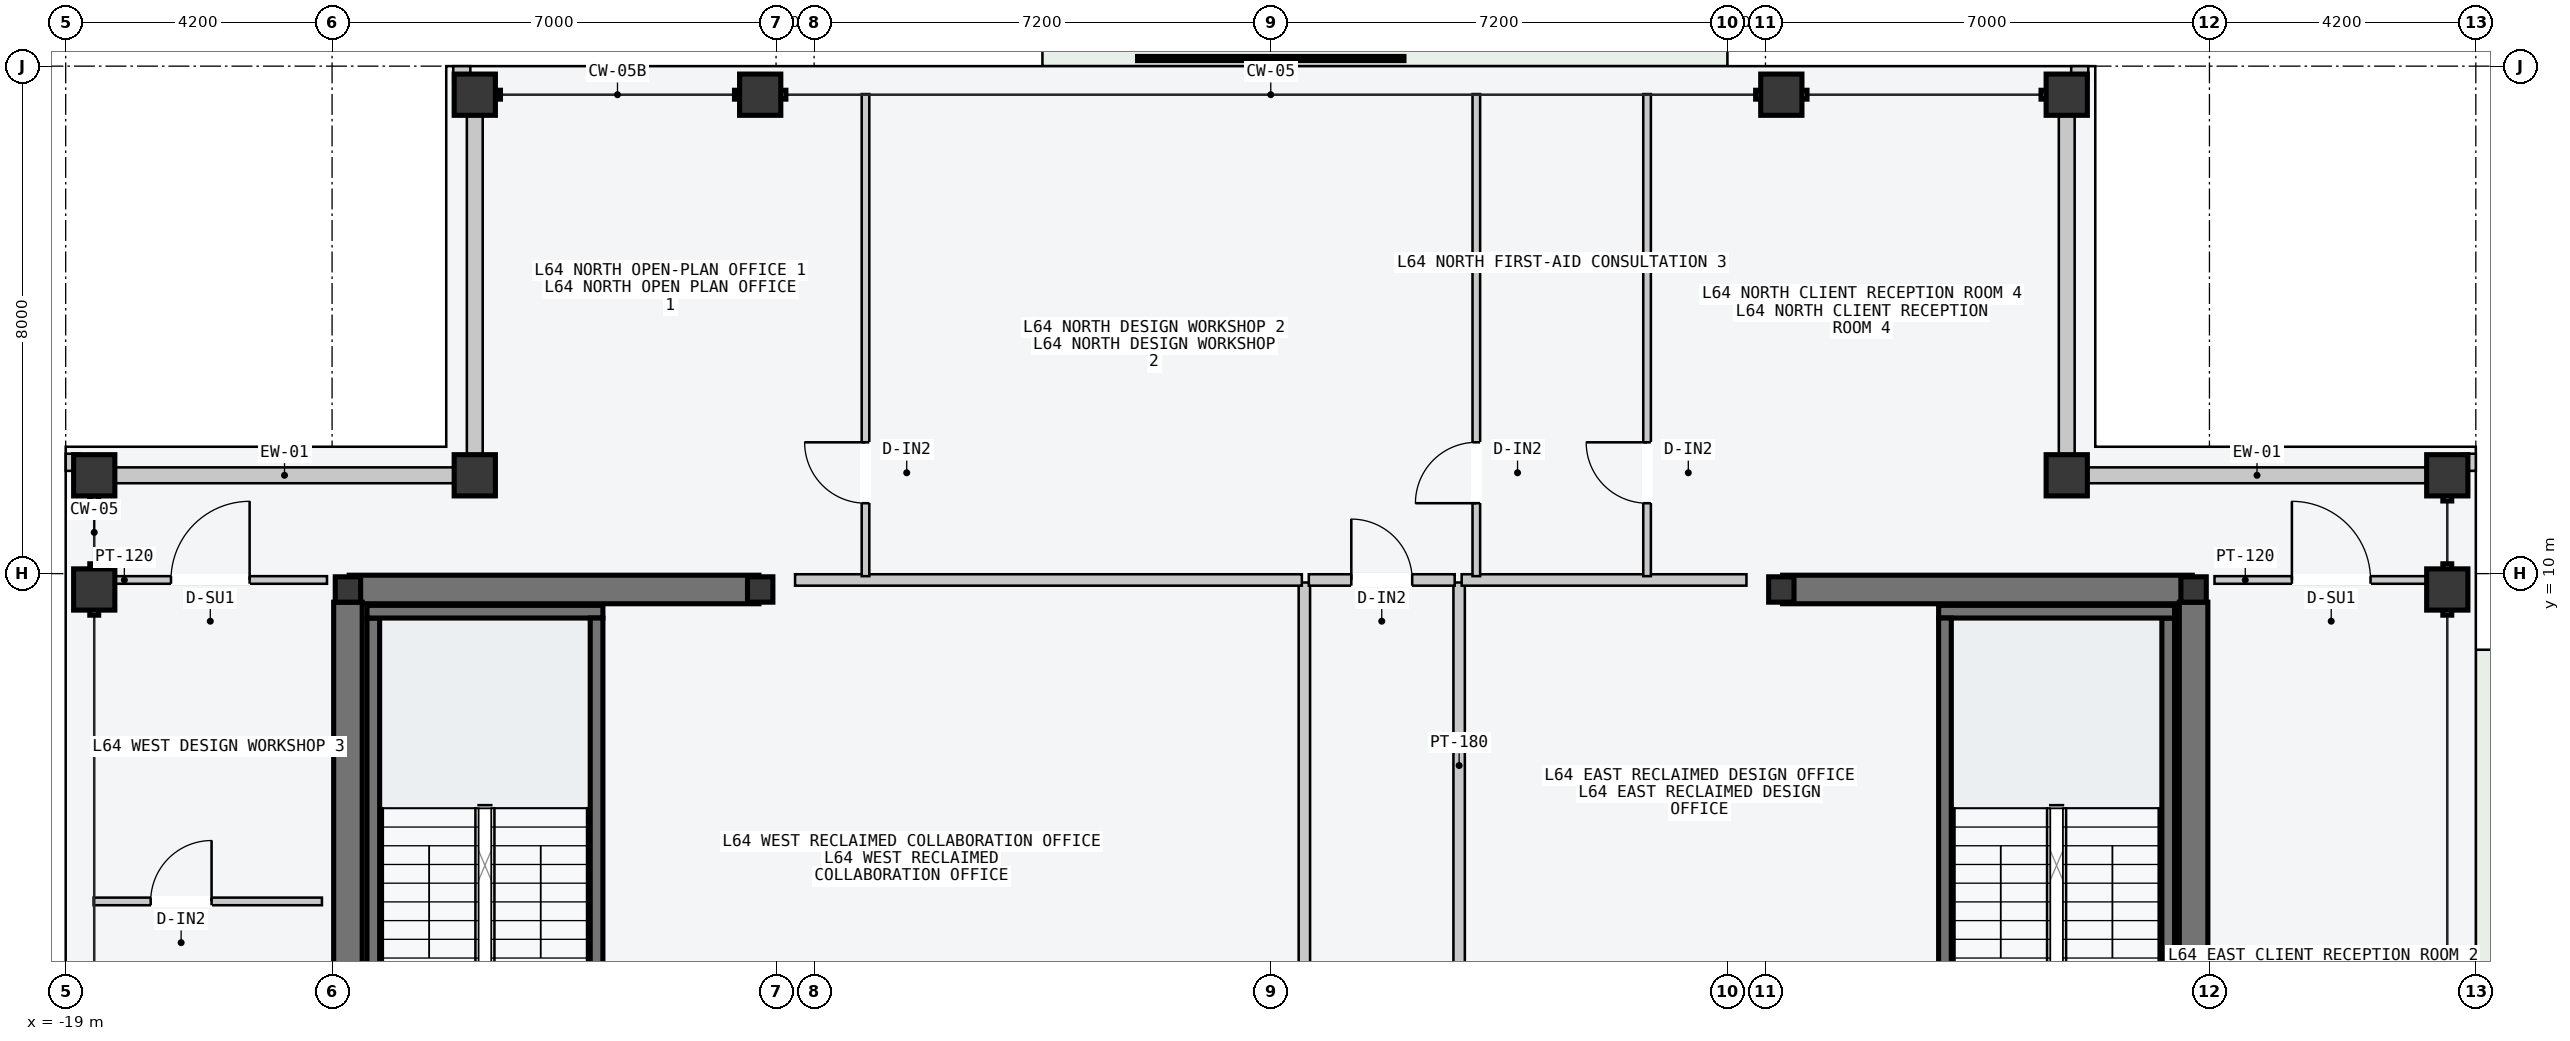
"""IFC4 building model, lengths in metres.
Left out: names, types, materials, properties, quantities, classifications, styles, units other than length and angle.
Written with IfcOpenShell. Run it as: python <this file> out.ifc"""

import sys

from ifc_helpers import new_model, si_unit, direction, frame, frame_2d, origin, origin_2d, place, context, subcontext, project, spatial, rectangle, hollow_rectangle, i_section, extrude, element, fill, save


model = new_model("IFC4")
c1 = context("Model", 3, precision=1e-05, world=origin(), true_north=direction((0.0, 1.0)))
c2 = subcontext(c1, "Body", "Model", "MODEL_VIEW")
j1 = project(units=[si_unit("LENGTHUNIT", "METRE"), si_unit("PLANEANGLEUNIT", "RADIAN")], contexts=[c1])
p1 = place(None, origin())
s1 = spatial("IfcSite", under=j1, at=p1, CompositionType="ELEMENT")
p2 = place(p1, origin())
s2 = spatial("IfcBuilding", under=s1, at=p2, CompositionType="ELEMENT")
p3 = place(p2, frame((0.0, 0.0, 243.6)))
s3 = spatial("IfcBuildingStorey", under=s2, at=p3, CompositionType="ELEMENT", Elevation=243.6)
p4 = place(p3, frame((-14.53, 9.75, -0.2), z_axis=(0.0, 0.0, 1.0), x_axis=(1.0, 0.0, 0.0)))
e1 = element("IfcWall", 1, at=p4, inside=s3, PredefinedType="SHEAR", context=c2, shape_type="SweptSolid", body=[
    extrude(rectangle(XDim=6.46, YDim=0.45, at=frame_2d((3.23, 0.0))), origin(), (0.0, 0.0, 1.0), 3.6),
])
p5 = place(p3, frame((-14.55, 0.2, -0.2), z_axis=(0.0, 0.0, 1.0), x_axis=(0.0, 1.0, 0.0)))
e2 = element("IfcWall", 2, at=p5, inside=s3, PredefinedType="SHEAR", context=c2, shape_type="SweptSolid", body=[
    extrude(rectangle(XDim=9.35, YDim=0.45, at=frame_2d((4.675, 0.0))), origin(), (0.0, 0.0, 1.0), 3.6),
])
p6 = place(p3, frame((8.07, 9.75, -0.2), z_axis=(0.0, 0.0, 1.0), x_axis=(1.0, 0.0, 0.0)))
e3 = element("IfcWall", 3, at=p6, inside=s3, PredefinedType="SHEAR", context=c2, shape_type="SweptSolid", body=[
    extrude(rectangle(XDim=6.46, YDim=0.45, at=frame_2d((3.23, 0.0))), origin(), (0.0, 0.0, 1.0), 3.6),
])
p7 = place(p3, frame((14.55, 0.2, -0.2), z_axis=(0.0, 0.0, 1.0), x_axis=(0.0, 1.0, 0.0)))
e4 = element("IfcWall", 4, at=p7, inside=s3, PredefinedType="SHEAR", context=c2, shape_type="SweptSolid", body=[
    extrude(rectangle(XDim=9.35, YDim=0.45, at=frame_2d((4.675, 0.0))), origin(), (0.0, 0.0, 1.0), 3.6),
])
for number, where, z_axis, x_axis in (
    (5, (-14.15, 1.5, -0.2), (0.0, 0.0, 1.0), (0.0, 1.0, 0.0)),
    (6, (14.15, 1.5, -0.2), (0.0, 0.0, 1.0), (0.0, 1.0, 0.0)),
):
    element("IfcWall", number, at=place(p3, frame(where, z_axis=z_axis, x_axis=x_axis)), inside=s3, PredefinedType="SOLIDWALL", context=c2, shape_type="SweptSolid", body=[
        extrude(rectangle(XDim=7.8, YDim=0.2, at=frame_2d((3.9, 0.0))), origin(), (0.0, 0.0, 1.0), 3.6),
    ])
p8 = place(p3, frame((-14.25, 9.4, -0.2), z_axis=(0.0, 0.0, 1.0), x_axis=(1.0, 0.0, 0.0)))
e7 = element("IfcWall", 7, at=p8, inside=s3, PredefinedType="SOLIDWALL", context=c2, shape_type="SweptSolid", body=[
    extrude(rectangle(XDim=3.72, YDim=0.2, at=frame_2d((1.86, 0.0))), origin(), (0.0, 0.0, 1.0), 3.6),
])
p9 = place(p3, frame((-10.63, 1.5, -0.2), z_axis=(0.0, 0.0, 1.0), x_axis=(0.0, 1.0, 0.0)))
e8 = element("IfcWall", 8, at=p9, inside=s3, PredefinedType="SOLIDWALL", context=c2, shape_type="SweptSolid", body=[
    extrude(rectangle(XDim=7.8, YDim=0.2, at=frame_2d((3.9, 0.0))), origin(), (0.0, 0.0, 1.0), 3.6),
])
p10 = place(p3, frame((10.53, 9.4, -0.2), z_axis=(0.0, 0.0, 1.0), x_axis=(1.0, 0.0, 0.0)))
e9 = element("IfcWall", 9, at=p10, inside=s3, PredefinedType="SOLIDWALL", context=c2, shape_type="SweptSolid", body=[
    extrude(rectangle(XDim=3.72, YDim=0.2, at=frame_2d((1.86, 0.0))), origin(), (0.0, 0.0, 1.0), 3.6),
])
p11 = place(p3, frame((10.63, 1.5, -0.2), z_axis=(0.0, 0.0, 1.0), x_axis=(0.0, 1.0, 0.0)))
e10 = element("IfcWall", 10, at=p11, inside=s3, PredefinedType="SOLIDWALL", context=c2, shape_type="SweptSolid", body=[
    extrude(rectangle(XDim=7.8, YDim=0.2, at=frame_2d((3.9, 0.0))), origin(), (0.0, 0.0, 1.0), 3.6),
])
for number, where, z_axis, x_axis in (
    (11, (-14.55, 9.75, 0.0), (0.0, 0.0, 1.0), (1.0, 0.0, 0.0)),
    (12, (-8.05, 9.75, 0.0), (0.0, 0.0, 1.0), (1.0, 0.0, 0.0)),
    (13, (8.05, 9.75, 0.0), (0.0, 0.0, 1.0), (1.0, 0.0, 0.0)),
    (14, (14.55, 9.75, 0.0), (0.0, 0.0, 1.0), (1.0, 0.0, 0.0)),
):
    element("IfcColumn", number, at=place(p3, frame(where, z_axis=z_axis, x_axis=x_axis)), inside=s3, PredefinedType="COLUMN", context=c2, shape_type="SweptSolid", body=[
        extrude(i_section(OverallWidth=0.4, OverallDepth=0.4, WebThickness=0.013, FlangeThickness=0.021, at=origin_2d()), origin(), (0.0, 0.0, 1.0), 3.6),
    ])
for number, where, z_axis, x_axis in (
    (15, (-12.55, 17.55, 0.0), (0.0, 0.0, 1.0), (1.0, 0.0, 0.0)),
    (16, (-8.05, 17.55, 0.0), (0.0, 0.0, 1.0), (1.0, 0.0, 0.0)),
    (17, (8.05, 17.55, 0.0), (0.0, 0.0, 1.0), (1.0, 0.0, 0.0)),
    (18, (12.55, 17.55, 0.0), (0.0, 0.0, 1.0), (1.0, 0.0, 0.0)),
    (19, (-18.55, 9.75, 0.0), (0.0, 0.0, 1.0), (0.0, 1.0, 0.0)),
    (20, (-18.55, 11.55, 0.0), (0.0, 0.0, 1.0), (0.0, 1.0, 0.0)),
    (21, (18.55, 9.75, 0.0), (0.0, 0.0, 1.0), (0.0, 1.0, 0.0)),
    (22, (18.55, 11.55, 0.0), (0.0, 0.0, 1.0), (0.0, 1.0, 0.0)),
    (23, (-12.55, 11.55, 0.0), (0.0, 0.0, 1.0), (1.0, 0.0, 0.0)),
    (24, (12.55, 11.55, 0.0), (0.0, 0.0, 1.0), (1.0, 0.0, 0.0)),
):
    element("IfcColumn", number, at=place(p3, frame(where, z_axis=z_axis, x_axis=x_axis)), inside=s3, PredefinedType="COLUMN", context=c2, shape_type="SweptSolid", body=[
        extrude(hollow_rectangle(XDim=0.65, YDim=0.65, WallThickness=0.028, at=origin_2d()), origin(), (0.0, 0.0, 1.0), 3.6),
    ])
for number, where, z_axis, x_axis in (
    (25, (-18.215, 11.55, 0.0), (0.0, 0.0, 1.0), (1.0, 0.0, 0.0)),
    (26, (-12.55, 11.885, 0.0), (0.0, 0.0, 1.0), (0.0, 1.0, 0.0)),
    (27, (12.885, 11.55, 0.0), (0.0, 0.0, 1.0), (1.0, 0.0, 0.0)),
    (28, (12.55, 11.885, 0.0), (0.0, 0.0, 1.0), (0.0, 1.0, 0.0)),
):
    element("IfcWall", number, at=place(p3, frame(where, z_axis=z_axis, x_axis=x_axis)), inside=s3, PredefinedType="STANDARD", context=c2, shape_type="SweptSolid", body=[
        extrude(rectangle(XDim=5.33, YDim=0.25, at=frame_2d((2.665, 0.0))), origin(), (0.0, 0.0, 1.0), 2.85),
    ])
for number, where, z_axis, x_axis in (
    (29, (-12.89, 17.89, 0.0), (0.0, 0.0, 1.0), (1.0, 0.0, 0.0)),
    (30, (-18.89, 11.62, 0.0), (0.0, 0.0, 1.0), (0.0, 1.0, 0.0)),
    (31, (12.62, 17.89, 0.0), (0.0, 0.0, 1.0), (1.0, 0.0, 0.0)),
    (32, (18.89, 11.62, 0.0), (0.0, 0.0, 1.0), (0.0, 1.0, 0.0)),
):
    element("IfcWall", number, at=place(p3, frame(where, z_axis=z_axis, x_axis=x_axis)), inside=s3, PredefinedType="PARAPET", context=c2, shape_type="SweptSolid", body=[
        extrude(rectangle(XDim=0.27, YDim=0.22, at=frame_2d((0.135, 0.0))), origin(), (0.0, 0.0, 1.0), 1.2),
    ])
p12 = place(p3, frame((0.53, -3.5, 0.0), z_axis=(0.0, 0.0, 1.0), x_axis=(0.0, 1.0, 0.0)))
e33 = element("IfcWall", 33, at=p12, inside=s3, PredefinedType="PARTITIONING", context=c2, shape_type="SweptSolid", body=[
    extrude(rectangle(XDim=13.36, YDim=0.18, at=frame_2d((6.68, 0.0))), origin(), (0.0, 0.0, 1.0), 3.4),
])
p13 = place(p12, frame((6.1, 0.0, 0.0)))
e34 = element("IfcOpeningElement", 34, at=p13, cuts=e33, PredefinedType="OPENING", context=c2, shape_type="SweptSolid", body=[
    extrude(rectangle(XDim=1.24, YDim=2.24, at=frame_2d((0.62, 1.12))), frame((0.0, 0.1, 0.0), z_axis=(0.0, -1.0, 0.0), x_axis=(1.0, 0.0, 0.0)), (0.0, 0.0, 1.0), 0.2),
])
p14 = place(p12, frame((1.6, 0.0, 0.0)))
e35 = element("IfcOpeningElement", 35, at=p14, cuts=e33, PredefinedType="OPENING", context=c2, shape_type="SweptSolid", body=[
    extrude(rectangle(XDim=0.96, YDim=2.18, at=frame_2d((0.48, 1.09))), frame((0.0, 0.1, 0.0), z_axis=(0.0, -1.0, 0.0), x_axis=(1.0, 0.0, 0.0)), (0.0, 0.0, 1.0), 0.2),
])
p15 = place(p3, frame((-7.5, 9.9, 0.0), z_axis=(0.0, 0.0, 1.0), x_axis=(1.0, 0.0, 0.0)))
e36 = element("IfcWall", 36, at=p15, inside=s3, PredefinedType="PARTITIONING", context=c2, shape_type="SweptSolid", body=[
    extrude(rectangle(XDim=7.99, YDim=0.18, at=frame_2d((3.995, 0.0))), origin(), (0.0, 0.0, 1.0), 3.4),
])
p16 = place(p3, frame((2.97, -3.5, 0.0), z_axis=(0.0, 0.0, 1.0), x_axis=(0.0, 1.0, 0.0)))
e37 = element("IfcWall", 37, at=p16, inside=s3, PredefinedType="PARTITIONING", context=c2, shape_type="SweptSolid", body=[
    extrude(rectangle(XDim=13.36, YDim=0.18, at=frame_2d((6.68, 0.0))), origin(), (0.0, 0.0, 1.0), 3.4),
])
p17 = place(p16, frame((6.1, 0.0, 0.0)))
e38 = element("IfcOpeningElement", 38, at=p17, cuts=e37, PredefinedType="OPENING", context=c2, shape_type="SweptSolid", body=[
    extrude(rectangle(XDim=1.24, YDim=2.24, at=frame_2d((0.62, 1.12))), frame((0.0, 0.1, 0.0), z_axis=(0.0, -1.0, 0.0), x_axis=(1.0, 0.0, 0.0)), (0.0, 0.0, 1.0), 0.2),
])
p18 = place(p16, frame((1.6, 0.0, 0.0)))
e39 = element("IfcOpeningElement", 39, at=p18, cuts=e37, PredefinedType="OPENING", context=c2, shape_type="SweptSolid", body=[
    extrude(rectangle(XDim=0.96, YDim=2.18, at=frame_2d((0.48, 1.09))), frame((0.0, 0.1, 0.0), z_axis=(0.0, -1.0, 0.0), x_axis=(1.0, 0.0, 0.0)), (0.0, 0.0, 1.0), 0.2),
])
p19 = place(p3, frame((3.01, 9.9, 0.0), z_axis=(0.0, 0.0, 1.0), x_axis=(1.0, 0.0, 0.0)))
e40 = element("IfcWall", 40, at=p19, inside=s3, PredefinedType="PARTITIONING", context=c2, shape_type="SweptSolid", body=[
    extrude(rectangle(XDim=4.49, YDim=0.18, at=frame_2d((2.245, 0.0))), origin(), (0.0, 0.0, 1.0), 3.4),
])
p20 = place(p3, frame((-6.39, 9.96, 0.0), z_axis=(0.0, 0.0, 1.0), x_axis=(0.0, 1.0, 0.0)))
e41 = element("IfcWall", 41, at=p20, inside=s3, PredefinedType="PARTITIONING", context=c2, shape_type="SweptSolid", body=[
    extrude(rectangle(XDim=7.6, YDim=0.12, at=frame_2d((3.8, 0.0))), origin(), (0.0, 0.0, 1.0), 3.4),
])
p21 = place(p20, frame((1.15, 0.0, 0.0)))
e42 = element("IfcOpeningElement", 42, at=p21, cuts=e41, PredefinedType="OPENING", context=c2, shape_type="SweptSolid", body=[
    extrude(rectangle(XDim=0.96, YDim=2.18, at=frame_2d((0.48, 1.09))), frame((0.0, 0.07, 0.0), z_axis=(0.0, -1.0, 0.0), x_axis=(1.0, 0.0, 0.0)), (0.0, 0.0, 1.0), 0.14),
])
p22 = place(p3, frame((3.241, 9.96, 0.0), z_axis=(0.0, 0.0, 1.0), x_axis=(0.0, 1.0, 0.0)))
e43 = element("IfcWall", 43, at=p22, inside=s3, PredefinedType="PARTITIONING", context=c2, shape_type="SweptSolid", body=[
    extrude(rectangle(XDim=7.6, YDim=0.12, at=frame_2d((3.8, 0.0))), origin(), (0.0, 0.0, 1.0), 3.4),
])
p23 = place(p22, frame((1.15, 0.0, 0.0)))
e44 = element("IfcOpeningElement", 44, at=p23, cuts=e43, PredefinedType="OPENING", context=c2, shape_type="SweptSolid", body=[
    extrude(rectangle(XDim=0.96, YDim=2.18, at=frame_2d((0.48, 1.09))), frame((0.0, 0.07, 0.0), z_axis=(0.0, -1.0, 0.0), x_axis=(1.0, 0.0, 0.0)), (0.0, 0.0, 1.0), 0.14),
])
p24 = place(p3, frame((5.933, 9.96, 0.0), z_axis=(0.0, 0.0, 1.0), x_axis=(0.0, 1.0, 0.0)))
e45 = element("IfcWall", 45, at=p24, inside=s3, PredefinedType="PARTITIONING", context=c2, shape_type="SweptSolid", body=[
    extrude(rectangle(XDim=7.6, YDim=0.12, at=frame_2d((3.8, 0.0))), origin(), (0.0, 0.0, 1.0), 3.4),
])
p25 = place(p24, frame((1.15, 0.0, 0.0)))
e46 = element("IfcOpeningElement", 46, at=p25, cuts=e45, PredefinedType="OPENING", context=c2, shape_type="SweptSolid", body=[
    extrude(rectangle(XDim=0.96, YDim=2.18, at=frame_2d((0.48, 1.09))), frame((0.0, 0.07, 0.0), z_axis=(0.0, -1.0, 0.0), x_axis=(1.0, 0.0, 0.0)), (0.0, 0.0, 1.0), 0.14),
])
p26 = place(p3, frame((0.6, 9.9, 0.0), z_axis=(0.0, 0.0, 1.0), x_axis=(1.0, 0.0, 0.0)))
e47 = element("IfcWall", 47, at=p26, inside=s3, PredefinedType="PARTITIONING", context=c2, shape_type="SweptSolid", body=[
    extrude(rectangle(XDim=2.3, YDim=0.18, at=frame_2d((1.15, 0.0))), origin(), (0.0, 0.0, 1.0), 3.4),
])
p27 = place(p26, frame((0.67, 0.0, 0.0)))
e48 = element("IfcOpeningElement", 48, at=p27, cuts=e47, PredefinedType="OPENING", context=c2, shape_type="SweptSolid", body=[
    extrude(rectangle(XDim=0.96, YDim=2.18, at=frame_2d((0.48, 1.09))), frame((0.0, 0.1, 0.0), z_axis=(0.0, -1.0, 0.0), x_axis=(1.0, 0.0, 0.0)), (0.0, 0.0, 1.0), 0.2),
])
p28 = place(p3, frame((-18.56, 9.9, 0.0), z_axis=(0.0, 0.0, 1.0), x_axis=(1.0, 0.0, 0.0)))
e49 = element("IfcWall", 49, at=p28, inside=s3, PredefinedType="PARTITIONING", context=c2, shape_type="SweptSolid", body=[
    extrude(rectangle(XDim=3.68, YDim=0.12, at=frame_2d((1.84, 0.0))), origin(), (0.0, 0.0, 1.0), 3.4),
])
p29 = place(p28, frame((1.22, 0.0, 0.0)))
e50 = element("IfcOpeningElement", 50, at=p29, cuts=e49, PredefinedType="OPENING", context=c2, shape_type="SweptSolid", body=[
    extrude(rectangle(XDim=1.24, YDim=2.24, at=frame_2d((0.62, 1.12))), frame((0.0, 0.07, 0.0), z_axis=(0.0, -1.0, 0.0), x_axis=(1.0, 0.0, 0.0)), (0.0, 0.0, 1.0), 0.14),
])
p30 = place(p3, frame((14.88, 9.9, 0.0), z_axis=(0.0, 0.0, 1.0), x_axis=(1.0, 0.0, 0.0)))
e51 = element("IfcWall", 51, at=p30, inside=s3, PredefinedType="PARTITIONING", context=c2, shape_type="SweptSolid", body=[
    extrude(rectangle(XDim=3.68, YDim=0.12, at=frame_2d((1.84, 0.0))), origin(), (0.0, 0.0, 1.0), 3.4),
])
p31 = place(p30, frame((1.22, 0.0, 0.0)))
e52 = element("IfcOpeningElement", 52, at=p31, cuts=e51, PredefinedType="OPENING", context=c2, shape_type="SweptSolid", body=[
    extrude(rectangle(XDim=1.24, YDim=2.24, at=frame_2d((0.62, 1.12))), frame((0.0, 0.07, 0.0), z_axis=(0.0, -1.0, 0.0), x_axis=(1.0, 0.0, 0.0)), (0.0, 0.0, 1.0), 0.14),
])
p32 = place(p3, frame((-18.56, 4.833, 0.0), z_axis=(0.0, 0.0, 1.0), x_axis=(1.0, 0.0, 0.0)))
e53 = element("IfcWall", 53, at=p32, inside=s3, PredefinedType="PARTITIONING", context=c2, shape_type="SweptSolid", body=[
    extrude(rectangle(XDim=3.6, YDim=0.12, at=frame_2d((1.8, 0.0))), origin(), (0.0, 0.0, 1.0), 3.4),
])
p33 = place(p32, frame((0.9, 0.0, 0.0)))
e54 = element("IfcOpeningElement", 54, at=p33, cuts=e53, PredefinedType="OPENING", context=c2, shape_type="SweptSolid", body=[
    extrude(rectangle(XDim=0.96, YDim=2.18, at=frame_2d((0.48, 1.09))), frame((0.0, 0.07, 0.0), z_axis=(0.0, -1.0, 0.0), x_axis=(1.0, 0.0, 0.0)), (0.0, 0.0, 1.0), 0.14),
])
p34 = place(p21, origin())
e55 = element("IfcDoor", 55, at=p34, inside=s3, OperationType="SINGLE_SWING_RIGHT", PredefinedType="DOOR", context=c2, shape_type="SweptSolid", body=[
    extrude(rectangle(XDim=0.96, YDim=2.18, at=frame_2d((0.48, 1.09))), frame((0.0, 0.025, 0.0), z_axis=(0.0, -1.0, 0.0), x_axis=(1.0, 0.0, 0.0)), (0.0, 0.0, 1.0), 0.05),
])
fill(e42, e55)
p35 = place(p23, origin())
e56 = element("IfcDoor", 56, at=p35, inside=s3, OperationType="SINGLE_SWING_LEFT", PredefinedType="DOOR", context=c2, shape_type="SweptSolid", body=[
    extrude(rectangle(XDim=0.96, YDim=2.18, at=frame_2d((0.48, 1.09))), frame((0.0, 0.025, 0.0), z_axis=(0.0, -1.0, 0.0), x_axis=(1.0, 0.0, 0.0)), (0.0, 0.0, 1.0), 0.05),
])
fill(e44, e56)
p36 = place(p25, origin())
e57 = element("IfcDoor", 57, at=p36, inside=s3, OperationType="SINGLE_SWING_RIGHT", PredefinedType="DOOR", context=c2, shape_type="SweptSolid", body=[
    extrude(rectangle(XDim=0.96, YDim=2.18, at=frame_2d((0.48, 1.09))), frame((0.0, 0.025, 0.0), z_axis=(0.0, -1.0, 0.0), x_axis=(1.0, 0.0, 0.0)), (0.0, 0.0, 1.0), 0.05),
])
fill(e46, e57)
p37 = place(p27, origin())
e58 = element("IfcDoor", 58, at=p37, inside=s3, OperationType="SINGLE_SWING_LEFT", PredefinedType="DOOR", context=c2, shape_type="SweptSolid", body=[
    extrude(rectangle(XDim=0.96, YDim=2.18, at=frame_2d((0.48, 1.09))), frame((0.0, 0.025, 0.0), z_axis=(0.0, -1.0, 0.0), x_axis=(1.0, 0.0, 0.0)), (0.0, 0.0, 1.0), 0.05),
])
fill(e48, e58)
p38 = place(p29, origin())
e59 = element("IfcDoor", 59, at=p38, inside=s3, OperationType="SINGLE_SWING_RIGHT", PredefinedType="DOOR", context=c2, shape_type="SweptSolid", body=[
    extrude(rectangle(XDim=1.24, YDim=2.24, at=frame_2d((0.62, 1.12))), frame((0.0, 0.025, 0.0), z_axis=(0.0, -1.0, 0.0), x_axis=(1.0, 0.0, 0.0)), (0.0, 0.0, 1.0), 0.05),
])
fill(e50, e59)
p39 = place(p31, origin())
e60 = element("IfcDoor", 60, at=p39, inside=s3, OperationType="SINGLE_SWING_LEFT", PredefinedType="DOOR", context=c2, shape_type="SweptSolid", body=[
    extrude(rectangle(XDim=1.24, YDim=2.24, at=frame_2d((0.62, 1.12))), frame((0.0, 0.025, 0.0), z_axis=(0.0, -1.0, 0.0), x_axis=(1.0, 0.0, 0.0)), (0.0, 0.0, 1.0), 0.05),
])
fill(e52, e60)
p40 = place(p33, origin())
e61 = element("IfcDoor", 61, at=p40, inside=s3, OperationType="SINGLE_SWING_RIGHT", PredefinedType="DOOR", context=c2, shape_type="SweptSolid", body=[
    extrude(rectangle(XDim=0.96, YDim=2.18, at=frame_2d((0.48, 1.09))), frame((0.0, 0.025, 0.0), z_axis=(0.0, -1.0, 0.0), x_axis=(1.0, 0.0, 0.0)), (0.0, 0.0, 1.0), 0.05),
])
fill(e54, e61)
save(model, sys.argv[1])
